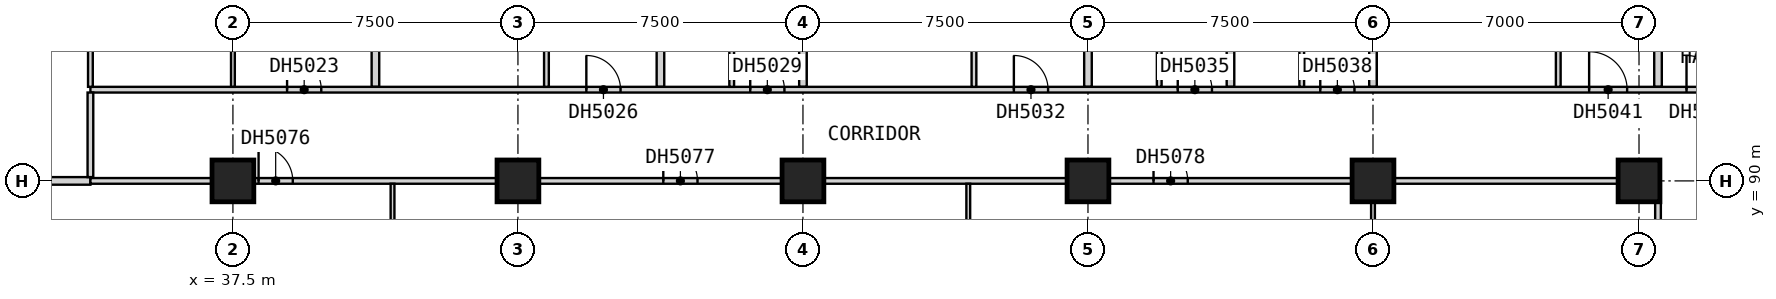
"""IFC4 building model, lengths in metres.
Left out: names, types, materials, properties, quantities, classifications, styles, units other than length and angle.
Written with IfcOpenShell. Run it as: python <this file> out.ifc"""

import sys

from ifc_helpers import new_model, si_unit, direction, frame, frame_2d, origin, origin_2d, place, context, subcontext, project, spatial, rectangle, extrude, element, fill, save


model = new_model("IFC4")
c1 = context("Model", 3, precision=1e-05, world=origin(), true_north=direction((0.0, 1.0)))
c2 = subcontext(c1, "Body", "Model", "MODEL_VIEW")
j1 = project(units=[si_unit("LENGTHUNIT", "METRE"), si_unit("PLANEANGLEUNIT", "RADIAN")], contexts=[c1])
p1 = place(None, origin())
s1 = spatial("IfcSite", under=j1, at=p1, CompositionType="ELEMENT")
p2 = place(p1, origin())
s2 = spatial("IfcBuilding", under=s1, at=p2, CompositionType="ELEMENT")
p3 = place(p2, frame((0.0, 0.0, 93.5)))
s3 = spatial("IfcBuildingStorey", under=s2, at=p3, CompositionType="ELEMENT", Elevation=93.5)
for number, where, z_axis, x_axis in (
    (1, (37.5, 90.0, 0.0), (0.0, 0.0, 1.0), (1.0, 0.0, 0.0)),
    (2, (45.0, 90.0, 0.0), (0.0, 0.0, 1.0), (1.0, 0.0, 0.0)),
    (3, (52.5, 90.0, 0.0), (0.0, 0.0, 1.0), (1.0, 0.0, 0.0)),
    (4, (60.0, 90.0, 0.0), (0.0, 0.0, 1.0), (1.0, 0.0, 0.0)),
    (5, (67.5, 90.0, 0.0), (0.0, 0.0, 1.0), (1.0, 0.0, 0.0)),
    (6, (74.5, 90.0, 0.0), (0.0, 0.0, 1.0), (1.0, 0.0, 0.0)),
):
    element("IfcColumn", number, at=place(p3, frame(where, z_axis=z_axis, x_axis=x_axis)), inside=s3, PredefinedType="COLUMN", context=c2, shape_type="SweptSolid", body=[
        extrude(rectangle(XDim=1.1, YDim=1.1, at=origin_2d()), origin(), (0.0, 0.0, 1.0), 3.6),
    ])
p4 = place(p3, frame((30.0, 90.0, 0.0), z_axis=(0.0, 0.0, 1.0), x_axis=(1.0, 0.0, 0.0)))
e7 = element("IfcWall", 7, at=p4, inside=s3, PredefinedType="PARTITIONING", context=c2, shape_type="SweptSolid", body=[
    extrude(rectangle(XDim=3.75, YDim=0.2, at=frame_2d((1.875, 0.0))), origin(), (0.0, 0.0, 1.0), 3.35),
])
for number, where, z_axis, x_axis in (
    (8, (41.25, 92.475, 0.0), (0.0, 0.0, 1.0), (0.0, 1.0, 0.0)),
    (9, (48.75, 92.475, 0.0), (0.0, 0.0, 1.0), (0.0, 1.0, 0.0)),
):
    element("IfcWall", number, at=place(p3, frame(where, z_axis=z_axis, x_axis=x_axis)), inside=s3, PredefinedType="PARTITIONING", context=c2, shape_type="SweptSolid", body=[
        extrude(rectangle(XDim=11.715, YDim=0.2, at=frame_2d((5.857, 0.0))), origin(), (0.0, 0.0, 1.0), 3.35),
    ])
for number, where, z_axis, x_axis in (
    (10, (52.5, 92.475, 0.0), (0.0, 0.0, 1.0), (0.0, 1.0, 0.0)),
    (11, (60.0, 92.475, 0.0), (0.0, 0.0, 1.0), (0.0, 1.0, 0.0)),
):
    element("IfcWall", number, at=place(p3, frame(where, z_axis=z_axis, x_axis=x_axis)), inside=s3, PredefinedType="PARTITIONING", context=c2, shape_type="SweptSolid", body=[
        extrude(rectangle(XDim=12.525, YDim=0.2, at=frame_2d((6.262, 0.0))), origin(), (0.0, 0.0, 1.0), 3.35),
    ])
p5 = place(p3, frame((63.75, 92.475, 0.0), z_axis=(0.0, 0.0, 1.0), x_axis=(0.0, 1.0, 0.0)))
e12 = element("IfcWall", 12, at=p5, inside=s3, PredefinedType="PARTITIONING", context=c2, shape_type="SweptSolid", body=[
    extrude(rectangle(XDim=11.715, YDim=0.2, at=frame_2d((5.857, 0.0))), origin(), (0.0, 0.0, 1.0), 3.35),
])
p6 = place(p3, frame((67.5, 92.475, 0.0), z_axis=(0.0, 0.0, 1.0), x_axis=(0.0, 1.0, 0.0)))
e13 = element("IfcWall", 13, at=p6, inside=s3, PredefinedType="PARTITIONING", context=c2, shape_type="SweptSolid", body=[
    extrude(rectangle(XDim=12.525, YDim=0.2, at=frame_2d((6.262, 0.0))), origin(), (0.0, 0.0, 1.0), 3.35),
])
p7 = place(p3, frame((75.0, 92.475, 0.0), z_axis=(0.0, 0.0, 1.0), x_axis=(0.0, 1.0, 0.0)))
e14 = element("IfcWall", 14, at=p7, inside=s3, PredefinedType="PARTITIONING", context=c2, shape_type="SweptSolid", body=[
    extrude(rectangle(XDim=11.715, YDim=0.2, at=frame_2d((5.857, 0.0))), origin(), (0.0, 0.0, 1.0), 3.35),
])
p8 = place(p3, frame((33.75, 90.0, 0.0), z_axis=(0.0, 0.0, 1.0), x_axis=(1.0, 0.0, 0.0)))
e15 = element("IfcWall", 15, at=p8, inside=s3, PredefinedType="PARTITIONING", context=c2, shape_type="SweptSolid", body=[
    extrude(rectangle(XDim=41.25, YDim=0.15, at=frame_2d((20.625, 0.0))), origin(), (0.0, 0.0, 1.0), 3.35),
])
p9 = place(p8, frame((4.425, 0.0, 0.0)))
e16 = element("IfcOpeningElement", 16, at=p9, cuts=e15, PredefinedType="OPENING", context=c2, shape_type="SweptSolid", body=[
    extrude(rectangle(XDim=0.9, YDim=2.1, at=frame_2d((0.45, 1.05))), frame((0.0, 0.085, 0.0), z_axis=(0.0, -1.0, 0.0), x_axis=(1.0, 0.0, 0.0)), (0.0, 0.0, 1.0), 0.17),
])
p10 = place(p8, frame((15.075, 0.0, 0.0)))
e17 = element("IfcOpeningElement", 17, at=p10, cuts=e15, PredefinedType="OPENING", context=c2, shape_type="SweptSolid", body=[
    extrude(rectangle(XDim=0.9, YDim=2.1, at=frame_2d((0.45, 1.05))), frame((0.0, 0.085, 0.0), z_axis=(0.0, -1.0, 0.0), x_axis=(1.0, 0.0, 0.0)), (0.0, 0.0, 1.0), 0.17),
])
p11 = place(p8, frame((27.975, 0.0, 0.0)))
e18 = element("IfcOpeningElement", 18, at=p11, cuts=e15, PredefinedType="OPENING", context=c2, shape_type="SweptSolid", body=[
    extrude(rectangle(XDim=0.9, YDim=2.1, at=frame_2d((0.45, 1.05))), frame((0.0, 0.085, 0.0), z_axis=(0.0, -1.0, 0.0), x_axis=(1.0, 0.0, 0.0)), (0.0, 0.0, 1.0), 0.17),
])
p12 = place(p3, frame((33.75, 92.4, 0.0), z_axis=(0.0, 0.0, 1.0), x_axis=(1.0, 0.0, 0.0)))
e19 = element("IfcWall", 19, at=p12, inside=s3, PredefinedType="PARTITIONING", context=c2, shape_type="SweptSolid", body=[
    extrude(rectangle(XDim=43.65, YDim=0.15, at=frame_2d((21.825, 0.0))), origin(), (0.0, 0.0, 1.0), 3.35),
])
p13 = place(p12, frame((5.175, 0.0, 0.0)))
e20 = element("IfcOpeningElement", 20, at=p13, cuts=e19, PredefinedType="OPENING", context=c2, shape_type="SweptSolid", body=[
    extrude(rectangle(XDim=0.9, YDim=2.1, at=frame_2d((0.45, 1.05))), frame((0.0, 0.085, 0.0), z_axis=(0.0, -1.0, 0.0), x_axis=(1.0, 0.0, 0.0)), (0.0, 0.0, 1.0), 0.17),
])
p14 = place(p12, frame((13.05, 0.0, 0.0)))
e21 = element("IfcOpeningElement", 21, at=p14, cuts=e19, PredefinedType="OPENING", context=c2, shape_type="SweptSolid", body=[
    extrude(rectangle(XDim=0.9, YDim=2.1, at=frame_2d((0.45, 1.05))), frame((0.0, 0.085, 0.0), z_axis=(0.0, -1.0, 0.0), x_axis=(1.0, 0.0, 0.0)), (0.0, 0.0, 1.0), 0.17),
])
p15 = place(p12, frame((17.363, 0.0, 0.0)))
e22 = element("IfcOpeningElement", 22, at=p15, cuts=e19, PredefinedType="OPENING", context=c2, shape_type="SweptSolid", body=[
    extrude(rectangle(XDim=0.9, YDim=2.1, at=frame_2d((0.45, 1.05))), frame((0.0, 0.085, 0.0), z_axis=(0.0, -1.0, 0.0), x_axis=(1.0, 0.0, 0.0)), (0.0, 0.0, 1.0), 0.17),
])
p16 = place(p12, frame((24.3, 0.0, 0.0)))
e23 = element("IfcOpeningElement", 23, at=p16, cuts=e19, PredefinedType="OPENING", context=c2, shape_type="SweptSolid", body=[
    extrude(rectangle(XDim=0.9, YDim=2.1, at=frame_2d((0.45, 1.05))), frame((0.0, 0.085, 0.0), z_axis=(0.0, -1.0, 0.0), x_axis=(1.0, 0.0, 0.0)), (0.0, 0.0, 1.0), 0.17),
])
p17 = place(p12, frame((28.613, 0.0, 0.0)))
e24 = element("IfcOpeningElement", 24, at=p17, cuts=e19, PredefinedType="OPENING", context=c2, shape_type="SweptSolid", body=[
    extrude(rectangle(XDim=0.9, YDim=2.1, at=frame_2d((0.45, 1.05))), frame((0.0, 0.085, 0.0), z_axis=(0.0, -1.0, 0.0), x_axis=(1.0, 0.0, 0.0)), (0.0, 0.0, 1.0), 0.17),
])
p18 = place(p12, frame((32.363, 0.0, 0.0)))
e25 = element("IfcOpeningElement", 25, at=p18, cuts=e19, PredefinedType="OPENING", context=c2, shape_type="SweptSolid", body=[
    extrude(rectangle(XDim=0.9, YDim=2.1, at=frame_2d((0.45, 1.05))), frame((0.0, 0.085, 0.0), z_axis=(0.0, -1.0, 0.0), x_axis=(1.0, 0.0, 0.0)), (0.0, 0.0, 1.0), 0.17),
])
p19 = place(p12, frame((39.438, 0.0, 0.0)))
e26 = element("IfcOpeningElement", 26, at=p19, cuts=e19, PredefinedType="OPENING", context=c2, shape_type="SweptSolid", body=[
    extrude(rectangle(XDim=1.0, YDim=2.1, at=frame_2d((0.5, 1.05))), frame((0.0, 0.085, 0.0), z_axis=(0.0, -1.0, 0.0), x_axis=(1.0, 0.0, 0.0)), (0.0, 0.0, 1.0), 0.17),
])
p20 = place(p12, frame((42.0, 0.0, 0.0)))
e27 = element("IfcOpeningElement", 27, at=p20, cuts=e19, PredefinedType="OPENING", context=c2, shape_type="SweptSolid", body=[
    extrude(rectangle(XDim=0.9, YDim=2.1, at=frame_2d((0.45, 1.05))), frame((0.0, 0.085, 0.0), z_axis=(0.0, -1.0, 0.0), x_axis=(1.0, 0.0, 0.0)), (0.0, 0.0, 1.0), 0.17),
])
p21 = place(p3, frame((33.75, 90.1, 0.0), z_axis=(0.0, 0.0, 1.0), x_axis=(0.0, 1.0, 0.0)))
e28 = element("IfcWall", 28, at=p21, inside=s3, PredefinedType="PARTITIONING", context=c2, shape_type="SweptSolid", body=[
    extrude(rectangle(XDim=2.225, YDim=0.15, at=frame_2d((1.112, 0.0))), origin(), (0.0, 0.0, 1.0), 3.35),
])
p22 = place(p3, frame((75.0, 78.075, 0.0), z_axis=(0.0, 0.0, 1.0), x_axis=(0.0, 1.0, 0.0)))
e29 = element("IfcWall", 29, at=p22, inside=s3, PredefinedType="PARTITIONING", context=c2, shape_type="SweptSolid", body=[
    extrude(rectangle(XDim=11.85, YDim=0.15, at=frame_2d((5.925, 0.0))), origin(), (0.0, 0.0, 1.0), 3.35),
])
p23 = place(p22, frame((7.725, 0.0, 0.0)))
e30 = element("IfcOpeningElement", 30, at=p23, cuts=e29, PredefinedType="OPENING", context=c2, shape_type="SweptSolid", body=[
    extrude(rectangle(XDim=0.9, YDim=2.1, at=frame_2d((0.45, 1.05))), frame((0.0, 0.085, 0.0), z_axis=(0.0, -1.0, 0.0), x_axis=(1.0, 0.0, 0.0)), (0.0, 0.0, 1.0), 0.17),
])
p24 = place(p22, frame((1.725, 0.0, 0.0)))
e31 = element("IfcOpeningElement", 31, at=p24, cuts=e29, PredefinedType="OPENING", context=c2, shape_type="SweptSolid", body=[
    extrude(rectangle(XDim=0.9, YDim=2.1, at=frame_2d((0.45, 1.05))), frame((0.0, 0.085, 0.0), z_axis=(0.0, -1.0, 0.0), x_axis=(1.0, 0.0, 0.0)), (0.0, 0.0, 1.0), 0.17),
])
p25 = place(p3, frame((37.5, 92.475, 0.0), z_axis=(0.0, 0.0, 1.0), x_axis=(0.0, 1.0, 0.0)))
e32 = element("IfcWall", 32, at=p25, inside=s3, PredefinedType="PARTITIONING", context=c2, shape_type="SweptSolid", body=[
    extrude(rectangle(XDim=4.225, YDim=0.1, at=frame_2d((2.112, 0.0))), origin(), (0.0, 0.0, 1.0), 3.35),
])
p26 = place(p25, frame((1.65, 0.0, 0.0)))
e33 = element("IfcOpeningElement", 33, at=p26, cuts=e32, PredefinedType="OPENING", context=c2, shape_type="SweptSolid", body=[
    extrude(rectangle(XDim=0.9, YDim=2.1, at=frame_2d((0.45, 1.05))), frame((0.0, 0.06, 0.0), z_axis=(0.0, -1.0, 0.0), x_axis=(1.0, 0.0, 0.0)), (0.0, 0.0, 1.0), 0.12),
])
for number, where, z_axis, x_axis in (
    (34, (41.7, 82.5, 0.0), (0.0, 0.0, 1.0), (0.0, 1.0, 0.0)),
    (35, (56.85, 82.5, 0.0), (0.0, 0.0, 1.0), (0.0, 1.0, 0.0)),
):
    element("IfcWall", number, at=place(p3, frame(where, z_axis=z_axis, x_axis=x_axis)), inside=s3, PredefinedType="PARTITIONING", context=c2, shape_type="SweptSolid", body=[
        extrude(rectangle(XDim=7.425, YDim=0.1, at=frame_2d((3.712, 0.0))), origin(), (0.0, 0.0, 1.0), 3.35),
    ])
p27 = place(p3, frame((67.5, 82.55, 0.0), z_axis=(0.0, 0.0, 1.0), x_axis=(0.0, 1.0, 0.0)))
e36 = element("IfcWall", 36, at=p27, inside=s3, PredefinedType="PARTITIONING", context=c2, shape_type="SweptSolid", body=[
    extrude(rectangle(XDim=7.375, YDim=0.1, at=frame_2d((3.688, 0.0))), origin(), (0.0, 0.0, 1.0), 3.35),
])
for number, where, z_axis, x_axis in (
    (37, (33.75, 92.475, 0.0), (0.0, 0.0, 1.0), (0.0, 1.0, 0.0)),
    (38, (45.75, 92.475, 0.0), (0.0, 0.0, 1.0), (0.0, 1.0, 0.0)),
    (39, (50.625, 92.475, 0.0), (0.0, 0.0, 1.0), (0.0, 1.0, 0.0)),
    (40, (57.0, 92.475, 0.0), (0.0, 0.0, 1.0), (0.0, 1.0, 0.0)),
    (41, (61.875, 92.475, 0.0), (0.0, 0.0, 1.0), (0.0, 1.0, 0.0)),
    (42, (65.625, 92.475, 0.0), (0.0, 0.0, 1.0), (0.0, 1.0, 0.0)),
    (43, (72.375, 92.475, 0.0), (0.0, 0.0, 1.0), (0.0, 1.0, 0.0)),
):
    element("IfcWall", number, at=place(p3, frame(where, z_axis=z_axis, x_axis=x_axis)), inside=s3, PredefinedType="PARTITIONING", context=c2, shape_type="SweptSolid", body=[
        extrude(rectangle(XDim=4.212, YDim=0.125, at=frame_2d((2.106, 0.0))), origin(), (0.0, 0.0, 1.0), 3.35),
    ])
p28 = place(p13, origin())
e44 = element("IfcDoor", 44, at=p28, inside=s3, OperationType="SINGLE_SWING_LEFT", PredefinedType="DOOR", context=c2, shape_type="SweptSolid", body=[
    extrude(rectangle(XDim=0.9, YDim=2.1, at=frame_2d((0.45, 1.05))), frame((0.0, 0.025, 0.0), z_axis=(0.0, -1.0, 0.0), x_axis=(1.0, 0.0, 0.0)), (0.0, 0.0, 1.0), 0.05),
])
fill(e20, e44)
p29 = place(p14, origin())
e45 = element("IfcDoor", 45, at=p29, inside=s3, OperationType="SINGLE_SWING_LEFT", PredefinedType="DOOR", context=c2, shape_type="SweptSolid", body=[
    extrude(rectangle(XDim=0.9, YDim=2.1, at=frame_2d((0.45, 1.05))), frame((0.0, 0.025, 0.0), z_axis=(0.0, -1.0, 0.0), x_axis=(1.0, 0.0, 0.0)), (0.0, 0.0, 1.0), 0.05),
])
fill(e21, e45)
p30 = place(p15, origin())
e46 = element("IfcDoor", 46, at=p30, inside=s3, OperationType="SINGLE_SWING_LEFT", PredefinedType="DOOR", context=c2, shape_type="SweptSolid", body=[
    extrude(rectangle(XDim=0.9, YDim=2.1, at=frame_2d((0.45, 1.05))), frame((0.0, 0.025, 0.0), z_axis=(0.0, -1.0, 0.0), x_axis=(1.0, 0.0, 0.0)), (0.0, 0.0, 1.0), 0.05),
])
fill(e22, e46)
p31 = place(p16, origin())
e47 = element("IfcDoor", 47, at=p31, inside=s3, OperationType="SINGLE_SWING_LEFT", PredefinedType="DOOR", context=c2, shape_type="SweptSolid", body=[
    extrude(rectangle(XDim=0.9, YDim=2.1, at=frame_2d((0.45, 1.05))), frame((0.0, 0.025, 0.0), z_axis=(0.0, -1.0, 0.0), x_axis=(1.0, 0.0, 0.0)), (0.0, 0.0, 1.0), 0.05),
])
fill(e23, e47)
p32 = place(p17, origin())
e48 = element("IfcDoor", 48, at=p32, inside=s3, OperationType="SINGLE_SWING_LEFT", PredefinedType="DOOR", context=c2, shape_type="SweptSolid", body=[
    extrude(rectangle(XDim=0.9, YDim=2.1, at=frame_2d((0.45, 1.05))), frame((0.0, 0.025, 0.0), z_axis=(0.0, -1.0, 0.0), x_axis=(1.0, 0.0, 0.0)), (0.0, 0.0, 1.0), 0.05),
])
fill(e24, e48)
p33 = place(p18, origin())
e49 = element("IfcDoor", 49, at=p33, inside=s3, OperationType="SINGLE_SWING_LEFT", PredefinedType="DOOR", context=c2, shape_type="SweptSolid", body=[
    extrude(rectangle(XDim=0.9, YDim=2.1, at=frame_2d((0.45, 1.05))), frame((0.0, 0.025, 0.0), z_axis=(0.0, -1.0, 0.0), x_axis=(1.0, 0.0, 0.0)), (0.0, 0.0, 1.0), 0.05),
])
fill(e25, e49)
p34 = place(p19, origin())
e50 = element("IfcDoor", 50, at=p34, inside=s3, OperationType="SINGLE_SWING_LEFT", PredefinedType="DOOR", context=c2, shape_type="SweptSolid", body=[
    extrude(rectangle(XDim=1.0, YDim=2.1, at=frame_2d((0.5, 1.05))), frame((0.0, 0.025, 0.0), z_axis=(0.0, -1.0, 0.0), x_axis=(1.0, 0.0, 0.0)), (0.0, 0.0, 1.0), 0.05),
])
fill(e26, e50)
p35 = place(p20, origin())
e51 = element("IfcDoor", 51, at=p35, inside=s3, OperationType="SINGLE_SWING_RIGHT", PredefinedType="DOOR", context=c2, shape_type="SweptSolid", body=[
    extrude(rectangle(XDim=0.9, YDim=2.1, at=frame_2d((0.45, 1.05))), frame((0.0, 0.025, 0.0), z_axis=(0.0, -1.0, 0.0), x_axis=(1.0, 0.0, 0.0)), (0.0, 0.0, 1.0), 0.05),
])
fill(e27, e51)
p36 = place(p9, origin())
e52 = element("IfcDoor", 52, at=p36, inside=s3, OperationType="SINGLE_SWING_LEFT", PredefinedType="DOOR", context=c2, shape_type="SweptSolid", body=[
    extrude(rectangle(XDim=0.9, YDim=2.1, at=frame_2d((0.45, 1.05))), frame((0.0, 0.025, 0.0), z_axis=(0.0, -1.0, 0.0), x_axis=(1.0, 0.0, 0.0)), (0.0, 0.0, 1.0), 0.05),
])
fill(e16, e52)
p37 = place(p10, origin())
e53 = element("IfcDoor", 53, at=p37, inside=s3, OperationType="SINGLE_SWING_RIGHT", PredefinedType="DOOR", context=c2, shape_type="SweptSolid", body=[
    extrude(rectangle(XDim=0.9, YDim=2.1, at=frame_2d((0.45, 1.05))), frame((0.0, 0.025, 0.0), z_axis=(0.0, -1.0, 0.0), x_axis=(1.0, 0.0, 0.0)), (0.0, 0.0, 1.0), 0.05),
])
fill(e17, e53)
p38 = place(p11, origin())
e54 = element("IfcDoor", 54, at=p38, inside=s3, OperationType="SINGLE_SWING_RIGHT", PredefinedType="DOOR", context=c2, shape_type="SweptSolid", body=[
    extrude(rectangle(XDim=0.9, YDim=2.1, at=frame_2d((0.45, 1.05))), frame((0.0, 0.025, 0.0), z_axis=(0.0, -1.0, 0.0), x_axis=(1.0, 0.0, 0.0)), (0.0, 0.0, 1.0), 0.05),
])
fill(e18, e54)
save(model, sys.argv[1])
